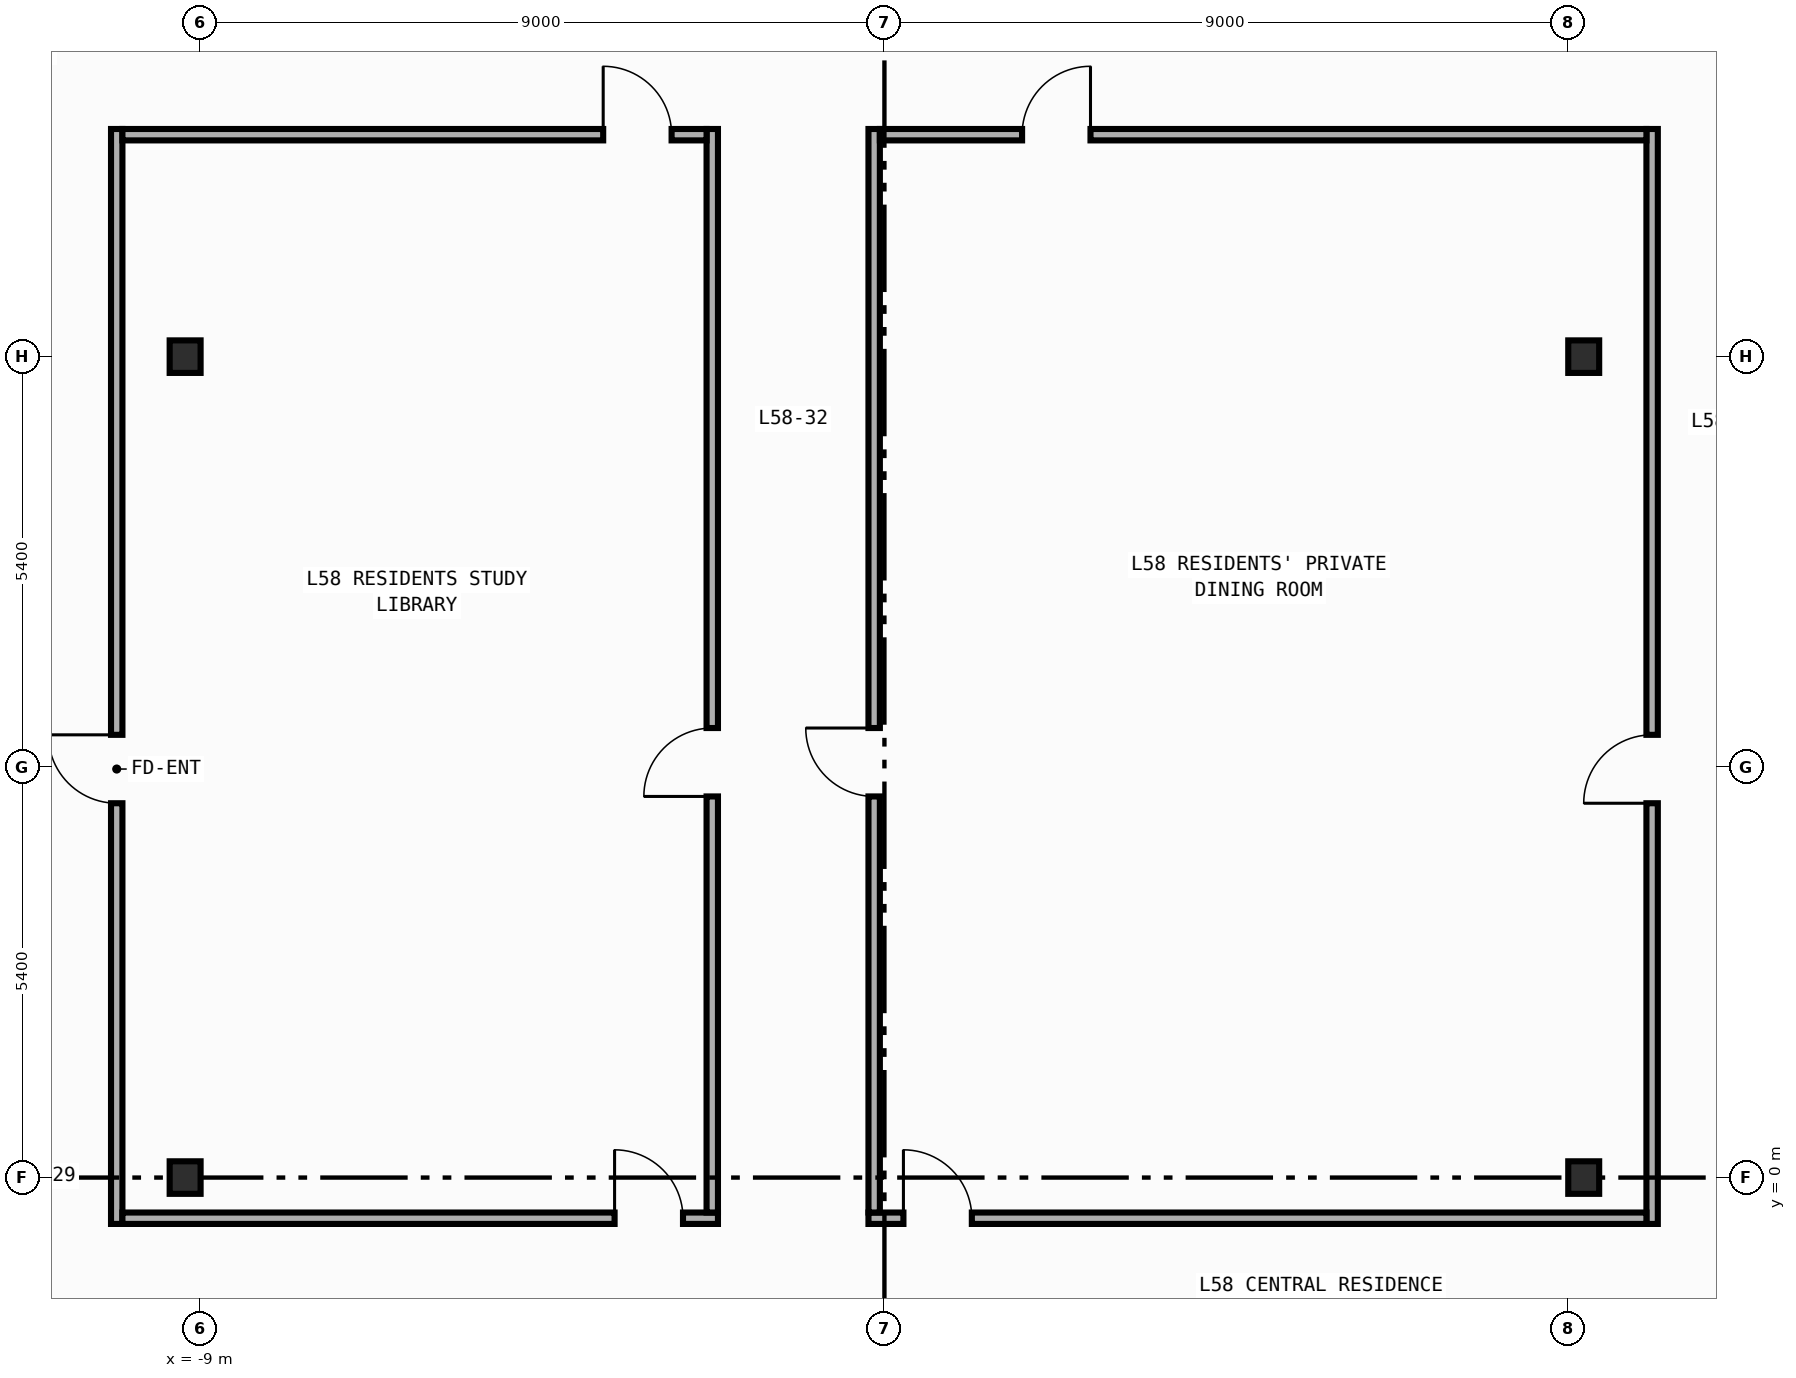
"""IFC4 building model, lengths in metres.
Left out: names, types, materials, properties, quantities, classifications, styles, units other than length and angle.
Written with IfcOpenShell. Run it as: python <this file> out.ifc"""

import sys

from ifc_helpers import new_model, si_unit, direction, frame, frame_2d, origin, origin_2d, place, context, subcontext, project, spatial, rectangle, i_section, extrude, element, fill, save


model = new_model("IFC4")
c1 = context("Model", 3, precision=1e-05, world=origin(), true_north=direction((0.0, 1.0)))
c2 = subcontext(c1, "Body", "Model", "MODEL_VIEW")
j1 = project(units=[si_unit("LENGTHUNIT", "METRE"), si_unit("PLANEANGLEUNIT", "RADIAN")], contexts=[c1])
p1 = place(None, origin())
s1 = spatial("IfcSite", under=j1, at=p1, CompositionType="ELEMENT")
p2 = place(p1, origin())
s2 = spatial("IfcBuilding", under=s1, at=p2, CompositionType="ELEMENT")
p3 = place(p2, frame((0.0, 0.0, 247.6)))
s3 = spatial("IfcBuildingStorey", under=s2, at=p3, CompositionType="ELEMENT", Elevation=247.6)
for number, where, z_axis, x_axis in (
    (1, (-9.2, 0.0, 0.0), (0.0, 0.0, 1.0), (1.0, 0.0, 0.0)),
    (2, (-9.2, 10.8, 0.0), (0.0, 0.0, 1.0), (1.0, 0.0, 0.0)),
    (3, (9.2, 0.0, 0.0), (0.0, 0.0, 1.0), (1.0, 0.0, 0.0)),
    (4, (9.2, 10.8, 0.0), (0.0, 0.0, 1.0), (1.0, 0.0, 0.0)),
):
    element("IfcColumn", number, at=place(p3, frame(where, z_axis=z_axis, x_axis=x_axis)), inside=s3, PredefinedType="COLUMN", context=c2, shape_type="SweptSolid", body=[
        extrude(i_section(OverallWidth=0.407, OverallDepth=0.428, WebThickness=0.02, FlangeThickness=0.035, FilletRadius=0.022, at=origin_2d()), origin(), (0.0, 0.0, 1.0), 3.6),
    ])
p4 = place(p3, frame((-10.1, -0.61, 0.0), z_axis=(0.0, 0.0, 1.0), x_axis=(0.0, 1.0, 0.0)))
e5 = element("IfcWall", 5, at=p4, inside=s3, PredefinedType="PARTITIONING", context=c2, shape_type="SweptSolid", body=[
    extrude(rectangle(XDim=14.405, YDim=0.15, at=frame_2d((7.203, 0.0))), origin(), (0.0, 0.0, 1.0), 3.34),
])
p5 = place(p4, frame((5.535, 0.0, 0.0)))
e6 = element("IfcOpeningElement", 6, at=p5, cuts=e5, PredefinedType="OPENING", context=c2, shape_type="SweptSolid", body=[
    extrude(rectangle(XDim=0.9, YDim=2.15, at=frame_2d((0.45, 1.075))), frame((0.0, 0.085, 0.0), z_axis=(0.0, -1.0, 0.0), x_axis=(1.0, 0.0, 0.0)), (0.0, 0.0, 1.0), 0.17),
])
p6 = place(p3, frame((10.1, -0.61, 0.0), z_axis=(0.0, 0.0, 1.0), x_axis=(0.0, 1.0, 0.0)))
e7 = element("IfcWall", 7, at=p6, inside=s3, PredefinedType="PARTITIONING", context=c2, shape_type="SweptSolid", body=[
    extrude(rectangle(XDim=14.405, YDim=0.15, at=frame_2d((7.203, 0.0))), origin(), (0.0, 0.0, 1.0), 3.34),
])
p7 = place(p6, frame((5.535, 0.0, 0.0)))
e8 = element("IfcOpeningElement", 8, at=p7, cuts=e7, PredefinedType="OPENING", context=c2, shape_type="SweptSolid", body=[
    extrude(rectangle(XDim=0.9, YDim=2.15, at=frame_2d((0.45, 1.075))), frame((0.0, 0.085, 0.0), z_axis=(0.0, -1.0, 0.0), x_axis=(1.0, 0.0, 0.0)), (0.0, 0.0, 1.0), 0.17),
])
p8 = place(p3, frame((-10.025, -0.535, 0.0), z_axis=(0.0, 0.0, 1.0), x_axis=(1.0, 0.0, 0.0)))
e9 = element("IfcWall", 9, at=p8, inside=s3, PredefinedType="PARTITIONING", context=c2, shape_type="SweptSolid", body=[
    extrude(rectangle(XDim=7.835, YDim=0.15, at=frame_2d((3.917, 0.0))), origin(), (0.0, 0.0, 1.0), 3.34),
])
p9 = place(p8, frame((6.475, 0.0, 0.0)))
e10 = element("IfcOpeningElement", 10, at=p9, cuts=e9, PredefinedType="OPENING", context=c2, shape_type="SweptSolid", body=[
    extrude(rectangle(XDim=0.9, YDim=2.15, at=frame_2d((0.45, 1.075))), frame((0.0, 0.085, 0.0), z_axis=(0.0, -1.0, 0.0), x_axis=(1.0, 0.0, 0.0)), (0.0, 0.0, 1.0), 0.17),
])
p10 = place(p3, frame((-0.21, -0.535, 0.0), z_axis=(0.0, 0.0, 1.0), x_axis=(1.0, 0.0, 0.0)))
e11 = element("IfcWall", 11, at=p10, inside=s3, PredefinedType="PARTITIONING", context=c2, shape_type="SweptSolid", body=[
    extrude(rectangle(XDim=10.235, YDim=0.15, at=frame_2d((5.117, 0.0))), origin(), (0.0, 0.0, 1.0), 3.34),
])
p11 = place(p10, frame((0.46, 0.0, 0.0)))
e12 = element("IfcOpeningElement", 12, at=p11, cuts=e11, PredefinedType="OPENING", context=c2, shape_type="SweptSolid", body=[
    extrude(rectangle(XDim=0.9, YDim=2.15, at=frame_2d((0.45, 1.075))), frame((0.0, 0.085, 0.0), z_axis=(0.0, -1.0, 0.0), x_axis=(1.0, 0.0, 0.0)), (0.0, 0.0, 1.0), 0.17),
])
p12 = place(p3, frame((-2.265, -0.46, 0.0), z_axis=(0.0, 0.0, 1.0), x_axis=(0.0, 1.0, 0.0)))
e13 = element("IfcWall", 13, at=p12, inside=s3, PredefinedType="PARTITIONING", context=c2, shape_type="SweptSolid", body=[
    extrude(rectangle(XDim=14.255, YDim=0.15, at=frame_2d((7.127, 0.0))), origin(), (0.0, 0.0, 1.0), 3.34),
])
p13 = place(p12, frame((5.474, 0.0, 0.0)))
e14 = element("IfcOpeningElement", 14, at=p13, cuts=e13, PredefinedType="OPENING", context=c2, shape_type="SweptSolid", body=[
    extrude(rectangle(XDim=0.9, YDim=2.15, at=frame_2d((0.45, 1.075))), frame((0.0, 0.085, 0.0), z_axis=(0.0, -1.0, 0.0), x_axis=(1.0, 0.0, 0.0)), (0.0, 0.0, 1.0), 0.17),
])
p14 = place(p3, frame((-0.135, -0.46, 0.0), z_axis=(0.0, 0.0, 1.0), x_axis=(0.0, 1.0, 0.0)))
e15 = element("IfcWall", 15, at=p14, inside=s3, PredefinedType="PARTITIONING", context=c2, shape_type="SweptSolid", body=[
    extrude(rectangle(XDim=14.255, YDim=0.15, at=frame_2d((7.127, 0.0))), origin(), (0.0, 0.0, 1.0), 3.34),
])
p15 = place(p14, frame((5.474, 0.0, 0.0)))
e16 = element("IfcOpeningElement", 16, at=p15, cuts=e15, PredefinedType="OPENING", context=c2, shape_type="SweptSolid", body=[
    extrude(rectangle(XDim=0.9, YDim=2.15, at=frame_2d((0.45, 1.075))), frame((0.0, 0.085, 0.0), z_axis=(0.0, -1.0, 0.0), x_axis=(1.0, 0.0, 0.0)), (0.0, 0.0, 1.0), 0.17),
])
p16 = place(p3, frame((-10.025, 13.72, 0.0), z_axis=(0.0, 0.0, 1.0), x_axis=(1.0, 0.0, 0.0)))
e17 = element("IfcWall", 17, at=p16, inside=s3, PredefinedType="PARTITIONING", context=c2, shape_type="SweptSolid", body=[
    extrude(rectangle(XDim=7.685, YDim=0.15, at=frame_2d((3.842, 0.0))), origin(), (0.0, 0.0, 1.0), 3.34),
])
p17 = place(p16, frame((6.325, 0.0, 0.0)))
e18 = element("IfcOpeningElement", 18, at=p17, cuts=e17, PredefinedType="OPENING", context=c2, shape_type="SweptSolid", body=[
    extrude(rectangle(XDim=0.9, YDim=2.15, at=frame_2d((0.45, 1.075))), frame((0.0, 0.085, 0.0), z_axis=(0.0, -1.0, 0.0), x_axis=(1.0, 0.0, 0.0)), (0.0, 0.0, 1.0), 0.17),
])
p18 = place(p3, frame((-0.06, 13.72, 0.0), z_axis=(0.0, 0.0, 1.0), x_axis=(1.0, 0.0, 0.0)))
e19 = element("IfcWall", 19, at=p18, inside=s3, PredefinedType="PARTITIONING", context=c2, shape_type="SweptSolid", body=[
    extrude(rectangle(XDim=10.085, YDim=0.15, at=frame_2d((5.042, 0.0))), origin(), (0.0, 0.0, 1.0), 3.34),
])
p19 = place(p18, frame((1.871, 0.0, 0.0)))
e20 = element("IfcOpeningElement", 20, at=p19, cuts=e19, PredefinedType="OPENING", context=c2, shape_type="SweptSolid", body=[
    extrude(rectangle(XDim=0.9, YDim=2.15, at=frame_2d((0.45, 1.075))), frame((0.0, 0.085, 0.0), z_axis=(0.0, -1.0, 0.0), x_axis=(1.0, 0.0, 0.0)), (0.0, 0.0, 1.0), 0.17),
])
p20 = place(p5, origin())
e21 = element("IfcDoor", 21, at=p20, inside=s3, OperationType="SINGLE_SWING_RIGHT", PredefinedType="DOOR", context=c2, shape_type="SweptSolid", body=[
    extrude(rectangle(XDim=0.9, YDim=2.15, at=frame_2d((0.45, 1.075))), frame((0.0, 0.025, 0.0), z_axis=(0.0, -1.0, 0.0), x_axis=(1.0, 0.0, 0.0)), (0.0, 0.0, 1.0), 0.05),
])
fill(e6, e21)
p21 = place(p7, origin())
e22 = element("IfcDoor", 22, at=p21, inside=s3, OperationType="SINGLE_SWING_LEFT", PredefinedType="DOOR", context=c2, shape_type="SweptSolid", body=[
    extrude(rectangle(XDim=0.9, YDim=2.15, at=frame_2d((0.45, 1.075))), frame((0.0, 0.025, 0.0), z_axis=(0.0, -1.0, 0.0), x_axis=(1.0, 0.0, 0.0)), (0.0, 0.0, 1.0), 0.05),
])
fill(e8, e22)
p22 = place(p9, origin())
e23 = element("IfcDoor", 23, at=p22, inside=s3, OperationType="SINGLE_SWING_LEFT", PredefinedType="DOOR", context=c2, shape_type="SweptSolid", body=[
    extrude(rectangle(XDim=0.9, YDim=2.15, at=frame_2d((0.45, 1.075))), frame((0.0, 0.025, 0.0), z_axis=(0.0, -1.0, 0.0), x_axis=(1.0, 0.0, 0.0)), (0.0, 0.0, 1.0), 0.05),
])
fill(e10, e23)
p23 = place(p11, origin())
e24 = element("IfcDoor", 24, at=p23, inside=s3, OperationType="SINGLE_SWING_LEFT", PredefinedType="DOOR", context=c2, shape_type="SweptSolid", body=[
    extrude(rectangle(XDim=0.9, YDim=2.15, at=frame_2d((0.45, 1.075))), frame((0.0, 0.025, 0.0), z_axis=(0.0, -1.0, 0.0), x_axis=(1.0, 0.0, 0.0)), (0.0, 0.0, 1.0), 0.05),
])
fill(e12, e24)
p24 = place(p13, origin())
e25 = element("IfcDoor", 25, at=p24, inside=s3, OperationType="SINGLE_SWING_LEFT", PredefinedType="DOOR", context=c2, shape_type="SweptSolid", body=[
    extrude(rectangle(XDim=0.9, YDim=2.15, at=frame_2d((0.45, 1.075))), frame((0.0, 0.025, 0.0), z_axis=(0.0, -1.0, 0.0), x_axis=(1.0, 0.0, 0.0)), (0.0, 0.0, 1.0), 0.05),
])
fill(e14, e25)
p25 = place(p15, origin())
e26 = element("IfcDoor", 26, at=p25, inside=s3, OperationType="SINGLE_SWING_RIGHT", PredefinedType="DOOR", context=c2, shape_type="SweptSolid", body=[
    extrude(rectangle(XDim=0.9, YDim=2.15, at=frame_2d((0.45, 1.075))), frame((0.0, 0.025, 0.0), z_axis=(0.0, -1.0, 0.0), x_axis=(1.0, 0.0, 0.0)), (0.0, 0.0, 1.0), 0.05),
])
fill(e16, e26)
p26 = place(p17, origin())
e27 = element("IfcDoor", 27, at=p26, inside=s3, OperationType="SINGLE_SWING_LEFT", PredefinedType="DOOR", context=c2, shape_type="SweptSolid", body=[
    extrude(rectangle(XDim=0.9, YDim=2.15, at=frame_2d((0.45, 1.075))), frame((0.0, 0.025, 0.0), z_axis=(0.0, -1.0, 0.0), x_axis=(1.0, 0.0, 0.0)), (0.0, 0.0, 1.0), 0.05),
])
fill(e18, e27)
p27 = place(p19, origin())
e28 = element("IfcDoor", 28, at=p27, inside=s3, OperationType="SINGLE_SWING_RIGHT", PredefinedType="DOOR", context=c2, shape_type="SweptSolid", body=[
    extrude(rectangle(XDim=0.9, YDim=2.15, at=frame_2d((0.45, 1.075))), frame((0.0, 0.025, 0.0), z_axis=(0.0, -1.0, 0.0), x_axis=(1.0, 0.0, 0.0)), (0.0, 0.0, 1.0), 0.05),
])
fill(e20, e28)
save(model, sys.argv[1])
